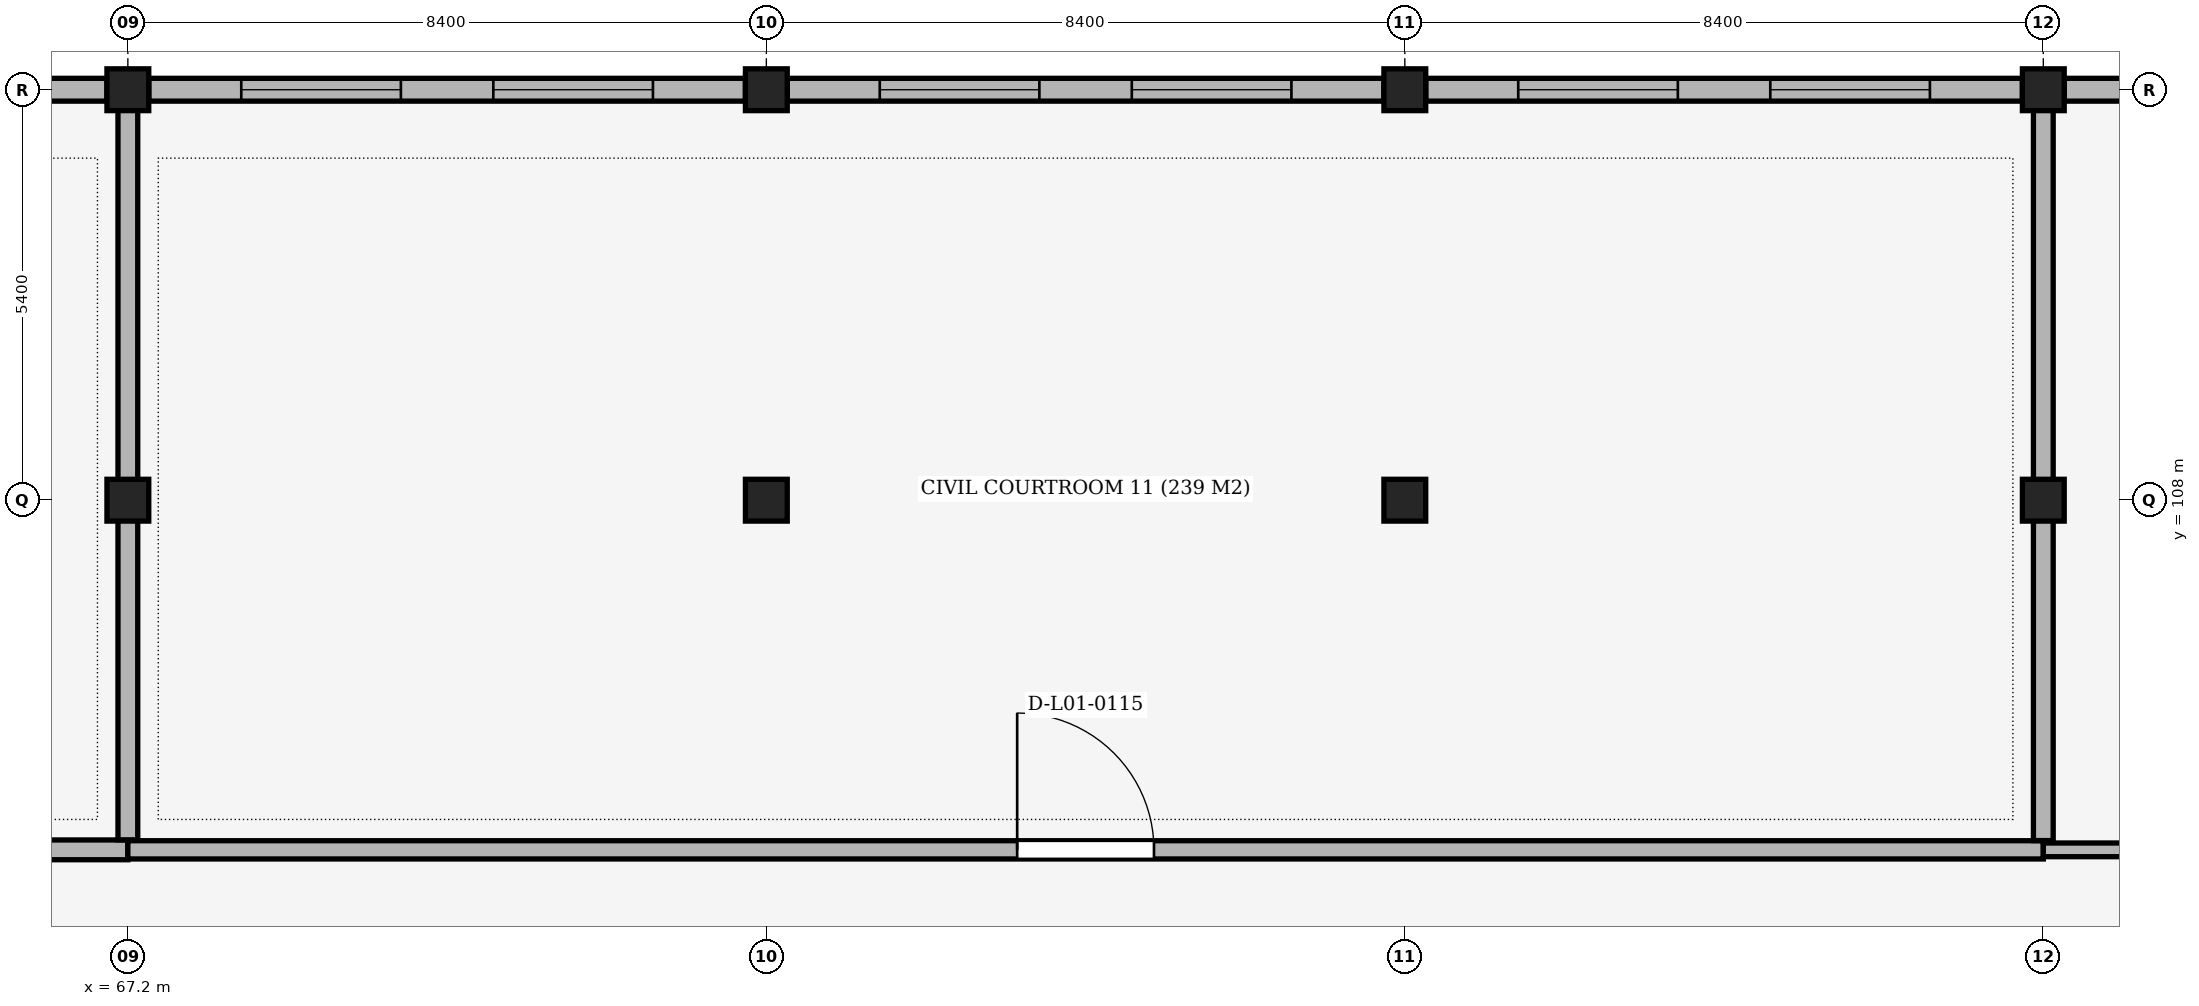
"""IFC4 building model, lengths in metres.
Left out: names, types, materials, properties, quantities, classifications, styles, units other than length and angle.
Written with IfcOpenShell. Run it as: python <this file> out.ifc"""

import sys

from ifc_helpers import new_model, si_unit, direction, frame, frame_2d, origin, origin_2d, place, context, subcontext, project, spatial, rectangle, extrude, element, fill, save


model = new_model("IFC4")
c1 = context("Model", 3, precision=1e-05, world=origin(), true_north=direction((0.0, 1.0)))
c2 = subcontext(c1, "Body", "Model", "MODEL_VIEW")
j1 = project(units=[si_unit("LENGTHUNIT", "METRE"), si_unit("PLANEANGLEUNIT", "RADIAN")], contexts=[c1])
p1 = place(None, origin())
s1 = spatial("IfcSite", under=j1, at=p1, CompositionType="ELEMENT")
p2 = place(p1, origin())
s2 = spatial("IfcBuilding", under=s1, at=p2, CompositionType="ELEMENT")
p3 = place(p2, frame((0.0, 0.0, 5.1)))
s3 = spatial("IfcBuildingStorey", under=s2, at=p3, CompositionType="ELEMENT", Elevation=5.1)
for number, where, z_axis, x_axis in (
    (1, (67.2, 108.0, 0.0), (0.0, 0.0, 1.0), (1.0, 0.0, 0.0)),
    (2, (67.2, 113.4, 0.0), (0.0, 0.0, 1.0), (1.0, 0.0, 0.0)),
    (3, (75.6, 108.0, 0.0), (0.0, 0.0, 1.0), (1.0, 0.0, 0.0)),
    (4, (75.6, 113.4, 0.0), (0.0, 0.0, 1.0), (1.0, 0.0, 0.0)),
    (5, (84.0, 108.0, 0.0), (0.0, 0.0, 1.0), (1.0, 0.0, 0.0)),
    (6, (84.0, 113.4, 0.0), (0.0, 0.0, 1.0), (1.0, 0.0, 0.0)),
    (7, (92.4, 108.0, 0.0), (0.0, 0.0, 1.0), (1.0, 0.0, 0.0)),
    (8, (92.4, 113.4, 0.0), (0.0, 0.0, 1.0), (1.0, 0.0, 0.0)),
):
    element("IfcColumn", number, at=place(p3, frame(where, z_axis=z_axis, x_axis=x_axis)), inside=s3, PredefinedType="COLUMN", context=c2, shape_type="SweptSolid", body=[
        extrude(rectangle(XDim=0.55, YDim=0.55, at=origin_2d()), origin(), (0.0, 0.0, 1.0), 5.1),
    ])
p4 = place(p3, frame((59.075, 113.4, 0.0), z_axis=(0.0, 0.0, 1.0), x_axis=(1.0, 0.0, 0.0)))
e9 = element("IfcWall", 9, at=p4, inside=s3, PredefinedType="SOLIDWALL", context=c2, shape_type="SweptSolid", body=[
    extrude(rectangle(XDim=7.85, YDim=0.3, at=frame_2d((3.925, 0.0))), origin(), (0.0, 0.0, 1.0), 4.12),
])
p5 = place(p4, frame((1.217, 0.0, 0.9)))
e10 = element("IfcOpeningElement", 10, at=p5, cuts=e9, PredefinedType="OPENING", context=c2, shape_type="SweptSolid", body=[
    extrude(rectangle(XDim=2.1, YDim=2.1, at=frame_2d((1.05, 1.05))), frame((0.0, 0.165, 0.0), z_axis=(0.0, -1.0, 0.0), x_axis=(1.0, 0.0, 0.0)), (0.0, 0.0, 1.0), 0.33),
])
p6 = place(p4, frame((4.533, 0.0, 0.9)))
e11 = element("IfcOpeningElement", 11, at=p6, cuts=e9, PredefinedType="OPENING", context=c2, shape_type="SweptSolid", body=[
    extrude(rectangle(XDim=2.1, YDim=2.1, at=frame_2d((1.05, 1.05))), frame((0.0, 0.165, 0.0), z_axis=(0.0, -1.0, 0.0), x_axis=(1.0, 0.0, 0.0)), (0.0, 0.0, 1.0), 0.33),
])
p7 = place(p3, frame((67.475, 113.4, 0.0), z_axis=(0.0, 0.0, 1.0), x_axis=(1.0, 0.0, 0.0)))
e12 = element("IfcWall", 12, at=p7, inside=s3, PredefinedType="SOLIDWALL", context=c2, shape_type="SweptSolid", body=[
    extrude(rectangle(XDim=7.85, YDim=0.3, at=frame_2d((3.925, 0.0))), origin(), (0.0, 0.0, 1.0), 4.12),
])
p8 = place(p7, frame((1.217, 0.0, 0.9)))
e13 = element("IfcOpeningElement", 13, at=p8, cuts=e12, PredefinedType="OPENING", context=c2, shape_type="SweptSolid", body=[
    extrude(rectangle(XDim=2.1, YDim=2.1, at=frame_2d((1.05, 1.05))), frame((0.0, 0.165, 0.0), z_axis=(0.0, -1.0, 0.0), x_axis=(1.0, 0.0, 0.0)), (0.0, 0.0, 1.0), 0.33),
])
p9 = place(p7, frame((4.533, 0.0, 0.9)))
e14 = element("IfcOpeningElement", 14, at=p9, cuts=e12, PredefinedType="OPENING", context=c2, shape_type="SweptSolid", body=[
    extrude(rectangle(XDim=2.1, YDim=2.1, at=frame_2d((1.05, 1.05))), frame((0.0, 0.165, 0.0), z_axis=(0.0, -1.0, 0.0), x_axis=(1.0, 0.0, 0.0)), (0.0, 0.0, 1.0), 0.33),
])
p10 = place(p3, frame((75.875, 113.4, 0.0), z_axis=(0.0, 0.0, 1.0), x_axis=(1.0, 0.0, 0.0)))
e15 = element("IfcWall", 15, at=p10, inside=s3, PredefinedType="SOLIDWALL", context=c2, shape_type="SweptSolid", body=[
    extrude(rectangle(XDim=7.85, YDim=0.3, at=frame_2d((3.925, 0.0))), origin(), (0.0, 0.0, 1.0), 4.12),
])
p11 = place(p10, frame((1.217, 0.0, 0.9)))
e16 = element("IfcOpeningElement", 16, at=p11, cuts=e15, PredefinedType="OPENING", context=c2, shape_type="SweptSolid", body=[
    extrude(rectangle(XDim=2.1, YDim=2.1, at=frame_2d((1.05, 1.05))), frame((0.0, 0.165, 0.0), z_axis=(0.0, -1.0, 0.0), x_axis=(1.0, 0.0, 0.0)), (0.0, 0.0, 1.0), 0.33),
])
p12 = place(p10, frame((4.533, 0.0, 0.9)))
e17 = element("IfcOpeningElement", 17, at=p12, cuts=e15, PredefinedType="OPENING", context=c2, shape_type="SweptSolid", body=[
    extrude(rectangle(XDim=2.1, YDim=2.1, at=frame_2d((1.05, 1.05))), frame((0.0, 0.165, 0.0), z_axis=(0.0, -1.0, 0.0), x_axis=(1.0, 0.0, 0.0)), (0.0, 0.0, 1.0), 0.33),
])
p13 = place(p3, frame((84.275, 113.4, 0.0), z_axis=(0.0, 0.0, 1.0), x_axis=(1.0, 0.0, 0.0)))
e18 = element("IfcWall", 18, at=p13, inside=s3, PredefinedType="SOLIDWALL", context=c2, shape_type="SweptSolid", body=[
    extrude(rectangle(XDim=7.85, YDim=0.3, at=frame_2d((3.925, 0.0))), origin(), (0.0, 0.0, 1.0), 4.12),
])
p14 = place(p13, frame((1.217, 0.0, 0.9)))
e19 = element("IfcOpeningElement", 19, at=p14, cuts=e18, PredefinedType="OPENING", context=c2, shape_type="SweptSolid", body=[
    extrude(rectangle(XDim=2.1, YDim=2.1, at=frame_2d((1.05, 1.05))), frame((0.0, 0.165, 0.0), z_axis=(0.0, -1.0, 0.0), x_axis=(1.0, 0.0, 0.0)), (0.0, 0.0, 1.0), 0.33),
])
p15 = place(p13, frame((4.533, 0.0, 0.9)))
e20 = element("IfcOpeningElement", 20, at=p15, cuts=e18, PredefinedType="OPENING", context=c2, shape_type="SweptSolid", body=[
    extrude(rectangle(XDim=2.1, YDim=2.1, at=frame_2d((1.05, 1.05))), frame((0.0, 0.165, 0.0), z_axis=(0.0, -1.0, 0.0), x_axis=(1.0, 0.0, 0.0)), (0.0, 0.0, 1.0), 0.33),
])
p16 = place(p3, frame((92.675, 113.4, 0.0), z_axis=(0.0, 0.0, 1.0), x_axis=(1.0, 0.0, 0.0)))
e21 = element("IfcWall", 21, at=p16, inside=s3, PredefinedType="SOLIDWALL", context=c2, shape_type="SweptSolid", body=[
    extrude(rectangle(XDim=7.85, YDim=0.3, at=frame_2d((3.925, 0.0))), origin(), (0.0, 0.0, 1.0), 4.12),
])
p17 = place(p16, frame((1.217, 0.0, 0.9)))
e22 = element("IfcOpeningElement", 22, at=p17, cuts=e21, PredefinedType="OPENING", context=c2, shape_type="SweptSolid", body=[
    extrude(rectangle(XDim=2.1, YDim=2.1, at=frame_2d((1.05, 1.05))), frame((0.0, 0.165, 0.0), z_axis=(0.0, -1.0, 0.0), x_axis=(1.0, 0.0, 0.0)), (0.0, 0.0, 1.0), 0.33),
])
p18 = place(p16, frame((4.533, 0.0, 0.9)))
e23 = element("IfcOpeningElement", 23, at=p18, cuts=e21, PredefinedType="OPENING", context=c2, shape_type="SweptSolid", body=[
    extrude(rectangle(XDim=2.1, YDim=2.1, at=frame_2d((1.05, 1.05))), frame((0.0, 0.165, 0.0), z_axis=(0.0, -1.0, 0.0), x_axis=(1.0, 0.0, 0.0)), (0.0, 0.0, 1.0), 0.33),
])
p19 = place(p3, frame((42.0, 103.4, 0.0), z_axis=(0.0, 0.0, 1.0), x_axis=(1.0, 0.0, 0.0)))
e24 = element("IfcWall", 24, at=p19, inside=s3, PredefinedType="PARTITIONING", context=c2, shape_type="SweptSolid", body=[
    extrude(rectangle(XDim=25.2, YDim=0.26, at=frame_2d((12.6, 0.0))), origin(), (0.0, 0.0, 1.0), 4.02),
])
p20 = place(p19, frame((11.7, 0.0, 0.0)))
e25 = element("IfcOpeningElement", 25, at=p20, cuts=e24, PredefinedType="OPENING", context=c2, shape_type="SweptSolid", body=[
    extrude(rectangle(XDim=1.8, YDim=2.4, at=frame_2d((0.9, 1.2))), frame((0.0, 0.145, 0.0), z_axis=(0.0, -1.0, 0.0), x_axis=(1.0, 0.0, 0.0)), (0.0, 0.0, 1.0), 0.29),
])
p21 = place(p3, frame((67.2, 103.4, 0.0), z_axis=(0.0, 0.0, 1.0), x_axis=(1.0, 0.0, 0.0)))
e26 = element("IfcWall", 26, at=p21, inside=s3, PredefinedType="PARTITIONING", context=c2, shape_type="SweptSolid", body=[
    extrude(rectangle(XDim=25.2, YDim=0.24, at=frame_2d((12.6, 0.0))), origin(), (0.0, 0.0, 1.0), 4.02),
])
p22 = place(p21, frame((11.7, 0.0, 0.0)))
e27 = element("IfcOpeningElement", 27, at=p22, cuts=e26, PredefinedType="OPENING", context=c2, shape_type="SweptSolid", body=[
    extrude(rectangle(XDim=1.8, YDim=2.4, at=frame_2d((0.9, 1.2))), frame((0.0, 0.135, 0.0), z_axis=(0.0, -1.0, 0.0), x_axis=(1.0, 0.0, 0.0)), (0.0, 0.0, 1.0), 0.27),
])
p23 = place(p3, frame((92.4, 103.4, 0.0), z_axis=(0.0, 0.0, 1.0), x_axis=(1.0, 0.0, 0.0)))
e28 = element("IfcWall", 28, at=p23, inside=s3, PredefinedType="PARTITIONING", context=c2, shape_type="SweptSolid", body=[
    extrude(rectangle(XDim=33.2, YDim=0.18, at=frame_2d((16.6, 0.0))), origin(), (0.0, 0.0, 1.0), 4.02),
])
p24 = place(p23, frame((16.1, 0.0, 0.0)))
e29 = element("IfcOpeningElement", 29, at=p24, cuts=e28, PredefinedType="OPENING", context=c2, shape_type="SweptSolid", body=[
    extrude(rectangle(XDim=1.0, YDim=2.2, at=frame_2d((0.5, 1.1))), frame((0.0, 0.105, 0.0), z_axis=(0.0, -1.0, 0.0), x_axis=(1.0, 0.0, 0.0)), (0.0, 0.0, 1.0), 0.21),
])
p25 = place(p3, frame((67.2, 103.532, 0.0), z_axis=(0.0, 0.0, 1.0), x_axis=(0.0, 1.0, 0.0)))
e30 = element("IfcWall", 30, at=p25, inside=s3, PredefinedType="PARTITIONING", context=c2, shape_type="SweptSolid", body=[
    extrude(rectangle(XDim=9.934, YDim=0.26, at=frame_2d((4.967, 0.0))), origin(), (0.0, 0.0, 1.0), 4.02),
])
p26 = place(p3, frame((92.4, 103.522, 0.0), z_axis=(0.0, 0.0, 1.0), x_axis=(0.0, 1.0, 0.0)))
e31 = element("IfcWall", 31, at=p26, inside=s3, PredefinedType="PARTITIONING", context=c2, shape_type="SweptSolid", body=[
    extrude(rectangle(XDim=9.944, YDim=0.26, at=frame_2d((4.972, 0.0))), origin(), (0.0, 0.0, 1.0), 4.02),
])
p27 = place(p8, origin())
e32 = element("IfcWindow", 32, at=p27, inside=s3, PartitioningType="SINGLE_PANEL", PredefinedType="WINDOW", context=c2, shape_type="SweptSolid", body=[
    extrude(rectangle(XDim=2.1, YDim=2.1, at=frame_2d((1.05, 1.05))), frame((0.0, 0.03, 0.0), z_axis=(0.0, -1.0, 0.0), x_axis=(1.0, 0.0, 0.0)), (0.0, 0.0, 1.0), 0.06),
])
fill(e13, e32)
p28 = place(p9, origin())
e33 = element("IfcWindow", 33, at=p28, inside=s3, PartitioningType="SINGLE_PANEL", PredefinedType="WINDOW", context=c2, shape_type="SweptSolid", body=[
    extrude(rectangle(XDim=2.1, YDim=2.1, at=frame_2d((1.05, 1.05))), frame((0.0, 0.03, 0.0), z_axis=(0.0, -1.0, 0.0), x_axis=(1.0, 0.0, 0.0)), (0.0, 0.0, 1.0), 0.06),
])
fill(e14, e33)
p29 = place(p11, origin())
e34 = element("IfcWindow", 34, at=p29, inside=s3, PartitioningType="SINGLE_PANEL", PredefinedType="WINDOW", context=c2, shape_type="SweptSolid", body=[
    extrude(rectangle(XDim=2.1, YDim=2.1, at=frame_2d((1.05, 1.05))), frame((0.0, 0.03, 0.0), z_axis=(0.0, -1.0, 0.0), x_axis=(1.0, 0.0, 0.0)), (0.0, 0.0, 1.0), 0.06),
])
fill(e16, e34)
p30 = place(p12, origin())
e35 = element("IfcWindow", 35, at=p30, inside=s3, PartitioningType="SINGLE_PANEL", PredefinedType="WINDOW", context=c2, shape_type="SweptSolid", body=[
    extrude(rectangle(XDim=2.1, YDim=2.1, at=frame_2d((1.05, 1.05))), frame((0.0, 0.03, 0.0), z_axis=(0.0, -1.0, 0.0), x_axis=(1.0, 0.0, 0.0)), (0.0, 0.0, 1.0), 0.06),
])
fill(e17, e35)
p31 = place(p14, origin())
e36 = element("IfcWindow", 36, at=p31, inside=s3, PartitioningType="SINGLE_PANEL", PredefinedType="WINDOW", context=c2, shape_type="SweptSolid", body=[
    extrude(rectangle(XDim=2.1, YDim=2.1, at=frame_2d((1.05, 1.05))), frame((0.0, 0.03, 0.0), z_axis=(0.0, -1.0, 0.0), x_axis=(1.0, 0.0, 0.0)), (0.0, 0.0, 1.0), 0.06),
])
fill(e19, e36)
p32 = place(p15, origin())
e37 = element("IfcWindow", 37, at=p32, inside=s3, PartitioningType="SINGLE_PANEL", PredefinedType="WINDOW", context=c2, shape_type="SweptSolid", body=[
    extrude(rectangle(XDim=2.1, YDim=2.1, at=frame_2d((1.05, 1.05))), frame((0.0, 0.03, 0.0), z_axis=(0.0, -1.0, 0.0), x_axis=(1.0, 0.0, 0.0)), (0.0, 0.0, 1.0), 0.06),
])
fill(e20, e37)
p33 = place(p22, origin())
e38 = element("IfcDoor", 38, at=p33, inside=s3, OperationType="SINGLE_SWING_LEFT", PredefinedType="DOOR", context=c2, shape_type="SweptSolid", body=[
    extrude(rectangle(XDim=1.8, YDim=2.4, at=frame_2d((0.9, 1.2))), frame((0.0, 0.025, 0.0), z_axis=(0.0, -1.0, 0.0), x_axis=(1.0, 0.0, 0.0)), (0.0, 0.0, 1.0), 0.05),
])
fill(e27, e38)
save(model, sys.argv[1])
